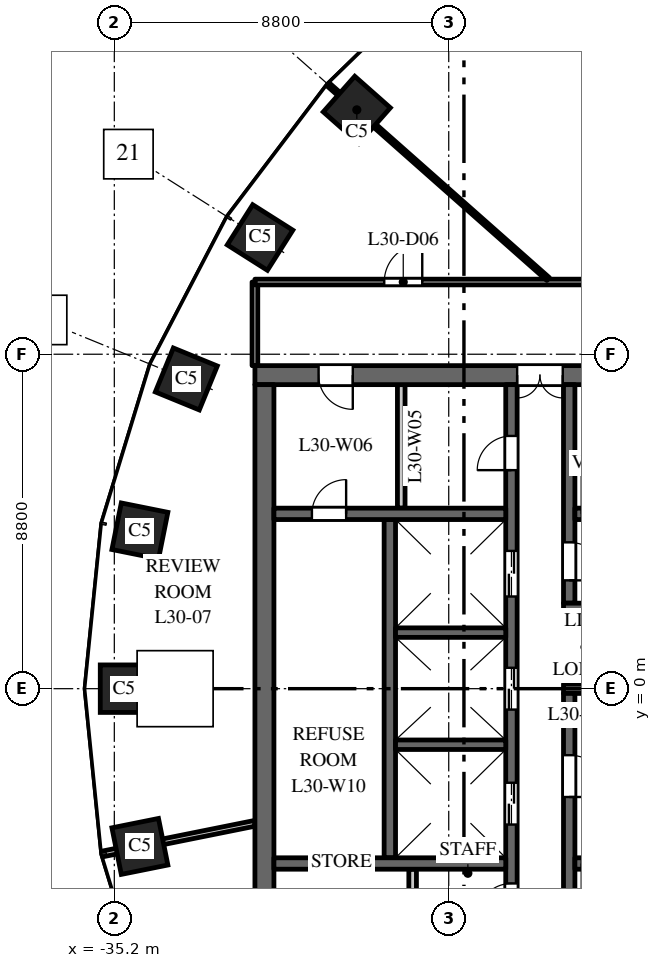
"""IFC4 building model, lengths in metres.
Left out: names, types, materials, properties, quantities, classifications, styles, units other than length and angle.
Written with IfcOpenShell. Run it as: python <this file> out.ifc"""

import sys

from ifc_helpers import new_model, si_unit, direction, frame, frame_2d, origin, origin_2d, place, context, subcontext, project, spatial, rectangle, extrude, element, fill, save


model = new_model("IFC4")
c1 = context("Model", 3, precision=1e-05, world=origin(), true_north=direction((0.0, 1.0)))
c2 = subcontext(c1, "Body", "Model", "MODEL_VIEW")
j1 = project(units=[si_unit("LENGTHUNIT", "METRE"), si_unit("PLANEANGLEUNIT", "RADIAN")], contexts=[c1])
p1 = place(None, origin())
s1 = spatial("IfcSite", under=j1, at=p1, CompositionType="ELEMENT")
p2 = place(p1, origin())
s2 = spatial("IfcBuilding", under=s1, at=p2, CompositionType="ELEMENT")
p3 = place(p2, frame((0.0, 0.0, 132.0)))
s3 = spatial("IfcBuildingStorey", under=s2, at=p3, CompositionType="ELEMENT", Elevation=132.0)
for number, where, z_axis, x_axis in (
    (1, (-28.819, 15.23, 0.0), (0.0, 0.0, 1.0), (-0.663, -0.749, 0.0)),
    (2, (-31.365, 11.871, 0.0), (0.0, 0.0, 1.0), (-0.535, -0.845, 0.0)),
    (3, (-33.305, 8.149, 0.0), (0.0, 0.0, 1.0), (-0.379, -0.925, 0.0)),
    (4, (-34.527, 4.151, 0.0), (0.0, 0.0, 1.0), (-0.197, -0.98, 0.0)),
    (5, (-34.945, 0.0, 0.0), (0.0, 0.0, 1.0), (0.0, -1.0, 0.0)),
    (6, (-34.527, -4.151, 0.0), (0.0, 0.0, 1.0), (0.197, -0.98, 0.0)),
):
    element("IfcColumn", number, at=place(p3, frame(where, z_axis=z_axis, x_axis=x_axis)), inside=s3, PredefinedType="COLUMN", context=c2, shape_type="SweptSolid", body=[
        extrude(rectangle(XDim=1.25, YDim=1.25, at=origin_2d()), origin(), (0.0, 0.0, 1.0), 4.0),
    ])
p4 = place(p3, frame((-16.5, 8.25, 0.0), z_axis=(0.0, 0.0, 1.0), x_axis=(-1.0, 0.0, 0.0)))
e7 = element("IfcWall", 7, at=p4, inside=s3, PredefinedType="SHEAR", context=c2, shape_type="SweptSolid", body=[
    extrude(rectangle(XDim=15.0, YDim=0.5, at=frame_2d((7.5, 0.0))), origin(), (0.0, 0.0, 1.0), 3.7),
])
p5 = place(p4, frame((6.9, 0.0, 0.0)))
e8 = element("IfcOpeningElement", 8, at=p5, cuts=e7, PredefinedType="OPENING", context=c2, shape_type="SweptSolid", body=[
    extrude(rectangle(XDim=1.2, YDim=2.1, at=frame_2d((0.6, 1.05))), frame((0.0, 0.26, 0.0), z_axis=(0.0, -1.0, 0.0), x_axis=(1.0, 0.0, 0.0)), (0.0, 0.0, 1.0), 0.52),
])
p6 = place(p4, frame((12.425, 0.0, 0.0)))
e9 = element("IfcOpeningElement", 9, at=p6, cuts=e7, PredefinedType="OPENING", context=c2, shape_type="SweptSolid", body=[
    extrude(rectangle(XDim=0.9, YDim=2.1, at=frame_2d((0.45, 1.05))), frame((0.0, 0.26, 0.0), z_axis=(0.0, -1.0, 0.0), x_axis=(1.0, 0.0, 0.0)), (0.0, 0.0, 1.0), 0.52),
])
p7 = place(p3, frame((-27.95, -4.45, 0.0), z_axis=(0.0, 0.0, 1.0), x_axis=(0.0, 1.0, 0.0)))
e10 = element("IfcWall", 10, at=p7, inside=s3, PredefinedType="SHEAR", context=c2, shape_type="SweptSolid", body=[
    extrude(rectangle(XDim=8.9, YDim=0.3, at=frame_2d((4.45, 0.0))), origin(), (0.0, 0.0, 1.0), 3.7),
])
p8 = place(p3, frame((-24.75, -8.0, 0.0), z_axis=(0.0, 0.0, 1.0), x_axis=(0.0, 1.0, 0.0)))
e11 = element("IfcWall", 11, at=p8, inside=s3, PredefinedType="SHEAR", context=c2, shape_type="SweptSolid", body=[
    extrude(rectangle(XDim=16.0, YDim=0.3, at=frame_2d((8.0, 0.0))), origin(), (0.0, 0.0, 1.0), 3.7),
])
p9 = place(p8, frame((4.425, 0.0, 0.0)))
e12 = element("IfcOpeningElement", 12, at=p9, cuts=e11, PredefinedType="OPENING", context=c2, shape_type="SweptSolid", body=[
    extrude(rectangle(XDim=1.1, YDim=2.1, at=frame_2d((0.55, 1.05))), frame((0.0, 0.16, 0.0), z_axis=(0.0, -1.0, 0.0), x_axis=(1.0, 0.0, 0.0)), (0.0, 0.0, 1.0), 0.32),
])
p10 = place(p8, frame((7.45, 0.0, 0.0)))
e13 = element("IfcOpeningElement", 13, at=p10, cuts=e11, PredefinedType="OPENING", context=c2, shape_type="SweptSolid", body=[
    extrude(rectangle(XDim=1.1, YDim=2.1, at=frame_2d((0.55, 1.05))), frame((0.0, 0.16, 0.0), z_axis=(0.0, -1.0, 0.0), x_axis=(1.0, 0.0, 0.0)), (0.0, 0.0, 1.0), 0.32),
])
p11 = place(p8, frame((10.425, 0.0, 0.0)))
e14 = element("IfcOpeningElement", 14, at=p11, cuts=e11, PredefinedType="OPENING", context=c2, shape_type="SweptSolid", body=[
    extrude(rectangle(XDim=1.2, YDim=2.1, at=frame_2d((0.6, 1.05))), frame((0.0, 0.16, 0.0), z_axis=(0.0, -1.0, 0.0), x_axis=(1.0, 0.0, 0.0)), (0.0, 0.0, 1.0), 0.32),
])
p12 = place(p8, frame((13.75, 0.0, 0.0)))
e15 = element("IfcOpeningElement", 15, at=p12, cuts=e11, PredefinedType="OPENING", context=c2, shape_type="SweptSolid", body=[
    extrude(rectangle(XDim=0.9, YDim=2.1, at=frame_2d((0.45, 1.05))), frame((0.0, 0.16, 0.0), z_axis=(0.0, -1.0, 0.0), x_axis=(1.0, 0.0, 0.0)), (0.0, 0.0, 1.0), 0.32),
])
p13 = place(p8, frame((1.975, 0.0, 0.0)))
e16 = element("IfcOpeningElement", 16, at=p13, cuts=e11, PredefinedType="OPENING", context=c2, shape_type="SweptSolid", body=[
    extrude(rectangle(XDim=0.9, YDim=2.1, at=frame_2d((0.45, 1.05))), frame((0.0, 0.16, 0.0), z_axis=(0.0, -1.0, 0.0), x_axis=(1.0, 0.0, 0.0)), (0.0, 0.0, 1.0), 0.32),
])
p14 = place(p8, frame((0.35, 0.0, 0.0)))
e17 = element("IfcOpeningElement", 17, at=p14, cuts=e11, PredefinedType="OPENING", context=c2, shape_type="SweptSolid", body=[
    extrude(rectangle(XDim=0.9, YDim=2.1, at=frame_2d((0.45, 1.05))), frame((0.0, 0.16, 0.0), z_axis=(0.0, -1.0, 0.0), x_axis=(1.0, 0.0, 0.0)), (0.0, 0.0, 1.0), 0.32),
])
p15 = place(p3, frame((-20.1, 0.0, 0.0), z_axis=(0.0, 0.0, 1.0), x_axis=(-1.0, 0.0, 0.0)))
e18 = element("IfcWall", 18, at=p15, inside=s3, PredefinedType="SHEAR", context=c2, shape_type="SweptSolid", body=[
    extrude(rectangle(XDim=3.28, YDim=0.25, at=frame_2d((1.64, 0.0))), origin(), (0.0, 0.0, 1.0), 3.7),
])
p16 = place(p3, frame((-31.25, -8.0, 0.0), z_axis=(0.0, 0.0, 1.0), x_axis=(0.0, 1.0, 0.0)))
e19 = element("IfcWall", 19, at=p16, inside=s3, PredefinedType="SHEAR", context=c2, shape_type="SweptSolid", body=[
    extrude(rectangle(XDim=16.0, YDim=0.5, at=frame_2d((8.0, 0.0))), origin(), (0.0, 0.0, 1.0), 3.7),
])
p17 = place(p3, frame((-24.9, 4.6, 0.0), z_axis=(0.0, 0.0, 1.0), x_axis=(-1.0, 0.0, 0.0)))
e20 = element("IfcWall", 20, at=p17, inside=s3, PredefinedType="SHEAR", context=c2, shape_type="SweptSolid", body=[
    extrude(rectangle(XDim=6.1, YDim=0.3, at=frame_2d((3.05, 0.0))), origin(), (0.0, 0.0, 1.0), 3.7),
])
p18 = place(p17, frame((4.2, 0.0, 0.0)))
e21 = element("IfcOpeningElement", 21, at=p18, cuts=e20, PredefinedType="OPENING", context=c2, shape_type="SweptSolid", body=[
    extrude(rectangle(XDim=0.9, YDim=2.1, at=frame_2d((0.45, 1.05))), frame((0.0, 0.16, 0.0), z_axis=(0.0, -1.0, 0.0), x_axis=(1.0, 0.0, 0.0)), (0.0, 0.0, 1.0), 0.32),
])
for number, where, z_axis, x_axis in (
    (22, (-27.65, 4.75, 0.0), (0.0, 0.0, 1.0), (0.0, 1.0, 0.0)),
    (23, (-27.35, -8.0, 0.0), (0.0, 0.0, 1.0), (0.0, 1.0, 0.0)),
):
    element("IfcWall", number, at=place(p3, frame(where, z_axis=z_axis, x_axis=x_axis)), inside=s3, PredefinedType="PARTITIONING", context=c2, shape_type="SweptSolid", body=[
        extrude(rectangle(XDim=3.25, YDim=0.2, at=frame_2d((1.625, 0.0))), origin(), (0.0, 0.0, 1.0), 3.7),
    ])
p19 = place(p3, frame((-24.9, -4.6, 0.0), z_axis=(0.0, 0.0, 1.0), x_axis=(-1.0, 0.0, 0.0)))
e24 = element("IfcWall", 24, at=p19, inside=s3, PredefinedType="SHEAR", context=c2, shape_type="SweptSolid", body=[
    extrude(rectangle(XDim=6.1, YDim=0.3, at=frame_2d((3.05, 0.0))), origin(), (0.0, 0.0, 1.0), 3.7),
])
for number, where, z_axis, x_axis in (
    (25, (-24.9, -1.475, 0.0), (0.0, 0.0, 1.0), (-1.0, 0.0, 0.0)),
    (26, (-24.9, 1.475, 0.0), (0.0, 0.0, 1.0), (-1.0, 0.0, 0.0)),
):
    element("IfcWall", number, at=place(p3, frame(where, z_axis=z_axis, x_axis=x_axis)), inside=s3, PredefinedType="SHEAR", context=c2, shape_type="SweptSolid", body=[
        extrude(rectangle(XDim=2.9, YDim=0.25, at=frame_2d((1.45, 0.0))), origin(), (0.0, 0.0, 1.0), 3.7),
    ])
p20 = place(p3, frame((-23.23, 2.25, 0.0), z_axis=(0.0, 0.0, 1.0), x_axis=(0.0, 1.0, 0.0)))
e27 = element("IfcWall", 27, at=p20, inside=s3, PredefinedType="SHEAR", context=c2, shape_type="SweptSolid", body=[
    extrude(rectangle(XDim=5.75, YDim=0.3, at=frame_2d((2.875, 0.0))), origin(), (0.0, 0.0, 1.0), 3.7),
])
p21 = place(p20, frame((0.6, 0.0, 0.0)))
e28 = element("IfcOpeningElement", 28, at=p21, cuts=e27, PredefinedType="OPENING", context=c2, shape_type="SweptSolid", body=[
    extrude(rectangle(XDim=1.0, YDim=2.1, at=frame_2d((0.5, 1.05))), frame((0.0, 0.16, 0.0), z_axis=(0.0, -1.0, 0.0), x_axis=(1.0, 0.0, 0.0)), (0.0, 0.0, 1.0), 0.32),
])
p22 = place(p3, frame((-23.23, -8.0, 0.0), z_axis=(0.0, 0.0, 1.0), x_axis=(0.0, 1.0, 0.0)))
e29 = element("IfcWall", 29, at=p22, inside=s3, PredefinedType="SHEAR", context=c2, shape_type="SweptSolid", body=[
    extrude(rectangle(XDim=7.875, YDim=0.3, at=frame_2d((3.938, 0.0))), origin(), (0.0, 0.0, 1.0), 3.7),
])
p23 = place(p22, frame((5.15, 0.0, 0.0)))
e30 = element("IfcOpeningElement", 30, at=p23, cuts=e29, PredefinedType="OPENING", context=c2, shape_type="SweptSolid", body=[
    extrude(rectangle(XDim=1.1, YDim=2.1, at=frame_2d((0.55, 1.05))), frame((0.0, 0.16, 0.0), z_axis=(0.0, -1.0, 0.0), x_axis=(1.0, 0.0, 0.0)), (0.0, 0.0, 1.0), 0.32),
])
p24 = place(p3, frame((-16.9, 4.6, 0.0), z_axis=(0.0, 0.0, 1.0), x_axis=(-1.0, 0.0, 0.0)))
e31 = element("IfcWall", 31, at=p24, inside=s3, PredefinedType="SHEAR", context=c2, shape_type="SweptSolid", body=[
    extrude(rectangle(XDim=6.18, YDim=0.3, at=frame_2d((3.09, 0.0))), origin(), (0.0, 0.0, 1.0), 3.7),
])
p25 = place(p24, frame((4.9, 0.0, 0.0)))
e32 = element("IfcOpeningElement", 32, at=p25, cuts=e31, PredefinedType="OPENING", context=c2, shape_type="SweptSolid", body=[
    extrude(rectangle(XDim=1.1, YDim=2.1, at=frame_2d((0.55, 1.05))), frame((0.0, 0.16, 0.0), z_axis=(0.0, -1.0, 0.0), x_axis=(1.0, 0.0, 0.0)), (0.0, 0.0, 1.0), 0.32),
])
p26 = place(p3, frame((-16.9, -4.6, 0.0), z_axis=(0.0, 0.0, 1.0), x_axis=(-1.0, 0.0, 0.0)))
e33 = element("IfcWall", 33, at=p26, inside=s3, PredefinedType="SHEAR", context=c2, shape_type="SweptSolid", body=[
    extrude(rectangle(XDim=6.18, YDim=0.3, at=frame_2d((3.09, 0.0))), origin(), (0.0, 0.0, 1.0), 3.7),
])
p27 = place(p26, frame((4.9, 0.0, 0.0)))
e34 = element("IfcOpeningElement", 34, at=p27, cuts=e33, PredefinedType="OPENING", context=c2, shape_type="SweptSolid", body=[
    extrude(rectangle(XDim=1.1, YDim=2.1, at=frame_2d((0.55, 1.05))), frame((0.0, 0.16, 0.0), z_axis=(0.0, -1.0, 0.0), x_axis=(1.0, 0.0, 0.0)), (0.0, 0.0, 1.0), 0.32),
])
p28 = place(p3, frame((-20.85, 2.125, 0.0), z_axis=(0.0, 0.0, 1.0), x_axis=(-1.0, 0.0, 0.0)))
e35 = element("IfcWall", 35, at=p28, inside=s3, PredefinedType="SHEAR", context=c2, shape_type="SweptSolid", body=[
    extrude(rectangle(XDim=2.53, YDim=0.25, at=frame_2d((1.265, 0.0))), origin(), (0.0, 0.0, 1.0), 3.7),
])
p29 = place(p3, frame((-35.512, -4.349, 0.0), z_axis=(0.0, 0.0, 1.0), x_axis=(0.980357474535, 0.197228857227, 0.0)))
e36 = element("IfcWall", 36, at=p29, inside=s3, PredefinedType="PARTITIONING", context=c2, shape_type="SweptSolid", body=[
    extrude(rectangle(XDim=4.092, YDim=0.15, at=frame_2d((2.046, 0.0))), origin(), (0.0, 0.0, 1.0), 3.2),
])
p30 = place(p3, frame((-31.5, 8.5, 0.0), z_axis=(0.0, 0.0, 1.0), x_axis=(0.0, 1.0, 0.0)))
e37 = element("IfcWall", 37, at=p30, inside=s3, PredefinedType="PARTITIONING", context=c2, shape_type="SweptSolid", body=[
    extrude(rectangle(XDim=2.2, YDim=0.15, at=frame_2d((1.1, 0.0))), origin(), (0.0, 0.0, 1.0), 3.7),
])
p31 = place(p3, frame((-31.5, 10.7, 0.0), z_axis=(0.0, 0.0, 1.0), x_axis=(1.0, 0.0, 0.0)))
e38 = element("IfcWall", 38, at=p31, inside=s3, PredefinedType="PARTITIONING", context=c2, shape_type="SweptSolid", body=[
    extrude(rectangle(XDim=11.723, YDim=0.15, at=frame_2d((5.861, 0.0))), origin(), (0.0, 0.0, 1.0), 3.1),
])
p32 = place(p31, frame((3.403, 0.0, 0.0)))
e39 = element("IfcOpeningElement", 39, at=p32, cuts=e38, PredefinedType="OPENING", context=c2, shape_type="SweptSolid", body=[
    extrude(rectangle(XDim=1.0, YDim=2.1, at=frame_2d((0.5, 1.05))), frame((0.0, 0.085, 0.0), z_axis=(0.0, -1.0, 0.0), x_axis=(1.0, 0.0, 0.0)), (0.0, 0.0, 1.0), 0.17),
])
p33 = place(p31, frame((9.323, 0.0, 0.0)))
e40 = element("IfcOpeningElement", 40, at=p33, cuts=e38, PredefinedType="OPENING", context=c2, shape_type="SweptSolid", body=[
    extrude(rectangle(XDim=1.0, YDim=2.1, at=frame_2d((0.5, 1.05))), frame((0.0, 0.085, 0.0), z_axis=(0.0, -1.0, 0.0), x_axis=(1.0, 0.0, 0.0)), (0.0, 0.0, 1.0), 0.17),
])
p34 = place(p3, frame((-29.569, 15.895, 0.0), z_axis=(0.0, 0.0, 1.0), x_axis=(0.748985701008, -0.662586160198, 0.0)))
e41 = element("IfcWall", 41, at=p34, inside=s3, PredefinedType="PARTITIONING", context=c2, shape_type="SweptSolid", body=[
    extrude(rectangle(XDim=7.723, YDim=0.1, at=frame_2d((3.861, 0.0))), origin(), (0.0, 0.0, 1.0), 2.9),
])
p35 = place(p9, origin())
e42 = element("IfcDoor", 42, at=p35, inside=s3, OperationType="DOUBLE_DOOR_SLIDING", PredefinedType="DOOR", context=c2, shape_type="SweptSolid", body=[
    extrude(rectangle(XDim=1.1, YDim=2.1, at=frame_2d((0.55, 1.05))), frame((0.0, 0.025, 0.0), z_axis=(0.0, -1.0, 0.0), x_axis=(1.0, 0.0, 0.0)), (0.0, 0.0, 1.0), 0.05),
])
fill(e12, e42)
p36 = place(p10, origin())
e43 = element("IfcDoor", 43, at=p36, inside=s3, OperationType="DOUBLE_DOOR_SLIDING", PredefinedType="DOOR", context=c2, shape_type="SweptSolid", body=[
    extrude(rectangle(XDim=1.1, YDim=2.1, at=frame_2d((0.55, 1.05))), frame((0.0, 0.025, 0.0), z_axis=(0.0, -1.0, 0.0), x_axis=(1.0, 0.0, 0.0)), (0.0, 0.0, 1.0), 0.05),
])
fill(e13, e43)
p37 = place(p11, origin())
e44 = element("IfcDoor", 44, at=p37, inside=s3, OperationType="DOUBLE_DOOR_SLIDING", PredefinedType="DOOR", context=c2, shape_type="SweptSolid", body=[
    extrude(rectangle(XDim=1.2, YDim=2.1, at=frame_2d((0.6, 1.05))), frame((0.0, 0.025, 0.0), z_axis=(0.0, -1.0, 0.0), x_axis=(1.0, 0.0, 0.0)), (0.0, 0.0, 1.0), 0.05),
])
fill(e14, e44)
p38 = place(p25, origin())
e45 = element("IfcDoor", 45, at=p38, inside=s3, OperationType="SINGLE_SWING_RIGHT", PredefinedType="DOOR", context=c2, shape_type="SweptSolid", body=[
    extrude(rectangle(XDim=1.1, YDim=2.1, at=frame_2d((0.55, 1.05))), frame((0.0, 0.025, 0.0), z_axis=(0.0, -1.0, 0.0), x_axis=(1.0, 0.0, 0.0)), (0.0, 0.0, 1.0), 0.05),
])
fill(e32, e45)
p39 = place(p27, origin())
e46 = element("IfcDoor", 46, at=p39, inside=s3, OperationType="SINGLE_SWING_LEFT", PredefinedType="DOOR", context=c2, shape_type="SweptSolid", body=[
    extrude(rectangle(XDim=1.1, YDim=2.1, at=frame_2d((0.55, 1.05))), frame((0.0, 0.025, 0.0), z_axis=(0.0, -1.0, 0.0), x_axis=(1.0, 0.0, 0.0)), (0.0, 0.0, 1.0), 0.05),
])
fill(e34, e46)
p40 = place(p23, origin())
e47 = element("IfcDoor", 47, at=p40, inside=s3, OperationType="SINGLE_SWING_LEFT", PredefinedType="DOOR", context=c2, shape_type="SweptSolid", body=[
    extrude(rectangle(XDim=1.1, YDim=2.1, at=frame_2d((0.55, 1.05))), frame((0.0, 0.025, 0.0), z_axis=(0.0, -1.0, 0.0), x_axis=(1.0, 0.0, 0.0)), (0.0, 0.0, 1.0), 0.05),
])
fill(e30, e47)
p41 = place(p21, origin())
e48 = element("IfcDoor", 48, at=p41, inside=s3, OperationType="SINGLE_SWING_LEFT", PredefinedType="DOOR", context=c2, shape_type="SweptSolid", body=[
    extrude(rectangle(XDim=1.0, YDim=2.1, at=frame_2d((0.5, 1.05))), frame((0.0, 0.025, 0.0), z_axis=(0.0, -1.0, 0.0), x_axis=(1.0, 0.0, 0.0)), (0.0, 0.0, 1.0), 0.05),
])
fill(e28, e48)
p42 = place(p5, origin())
e49 = element("IfcDoor", 49, at=p42, inside=s3, OperationType="DOUBLE_DOOR_DOUBLE_SWING", PredefinedType="DOOR", context=c2, shape_type="SweptSolid", body=[
    extrude(rectangle(XDim=1.2, YDim=2.1, at=frame_2d((0.6, 1.05))), frame((0.0, 0.025, 0.0), z_axis=(0.0, -1.0, 0.0), x_axis=(1.0, 0.0, 0.0)), (0.0, 0.0, 1.0), 0.05),
])
fill(e8, e49)
p43 = place(p12, origin())
e50 = element("IfcDoor", 50, at=p43, inside=s3, OperationType="SINGLE_SWING_RIGHT", PredefinedType="DOOR", context=c2, shape_type="SweptSolid", body=[
    extrude(rectangle(XDim=0.9, YDim=2.1, at=frame_2d((0.45, 1.05))), frame((0.0, 0.025, 0.0), z_axis=(0.0, -1.0, 0.0), x_axis=(1.0, 0.0, 0.0)), (0.0, 0.0, 1.0), 0.05),
])
fill(e15, e50)
p44 = place(p6, origin())
e51 = element("IfcDoor", 51, at=p44, inside=s3, OperationType="SINGLE_SWING_RIGHT", PredefinedType="DOOR", context=c2, shape_type="SweptSolid", body=[
    extrude(rectangle(XDim=0.9, YDim=2.1, at=frame_2d((0.45, 1.05))), frame((0.0, 0.025, 0.0), z_axis=(0.0, -1.0, 0.0), x_axis=(1.0, 0.0, 0.0)), (0.0, 0.0, 1.0), 0.05),
])
fill(e9, e51)
p45 = place(p13, origin())
e52 = element("IfcDoor", 52, at=p45, inside=s3, OperationType="SINGLE_SWING_RIGHT", PredefinedType="DOOR", context=c2, shape_type="SweptSolid", body=[
    extrude(rectangle(XDim=0.9, YDim=2.1, at=frame_2d((0.45, 1.05))), frame((0.0, 0.025, 0.0), z_axis=(0.0, -1.0, 0.0), x_axis=(1.0, 0.0, 0.0)), (0.0, 0.0, 1.0), 0.05),
])
fill(e16, e52)
p46 = place(p18, origin())
e53 = element("IfcDoor", 53, at=p46, inside=s3, OperationType="SINGLE_SWING_LEFT", PredefinedType="DOOR", context=c2, shape_type="SweptSolid", body=[
    extrude(rectangle(XDim=0.9, YDim=2.1, at=frame_2d((0.45, 1.05))), frame((0.0, 0.025, 0.0), z_axis=(0.0, -1.0, 0.0), x_axis=(1.0, 0.0, 0.0)), (0.0, 0.0, 1.0), 0.05),
])
fill(e21, e53)
p47 = place(p32, origin())
e54 = element("IfcDoor", 54, at=p47, inside=s3, OperationType="SINGLE_SWING_RIGHT", PredefinedType="DOOR", context=c2, shape_type="SweptSolid", body=[
    extrude(rectangle(XDim=1.0, YDim=2.1, at=frame_2d((0.5, 1.05))), frame((0.0, 0.025, 0.0), z_axis=(0.0, -1.0, 0.0), x_axis=(1.0, 0.0, 0.0)), (0.0, 0.0, 1.0), 0.05),
])
fill(e39, e54)
save(model, sys.argv[1])
